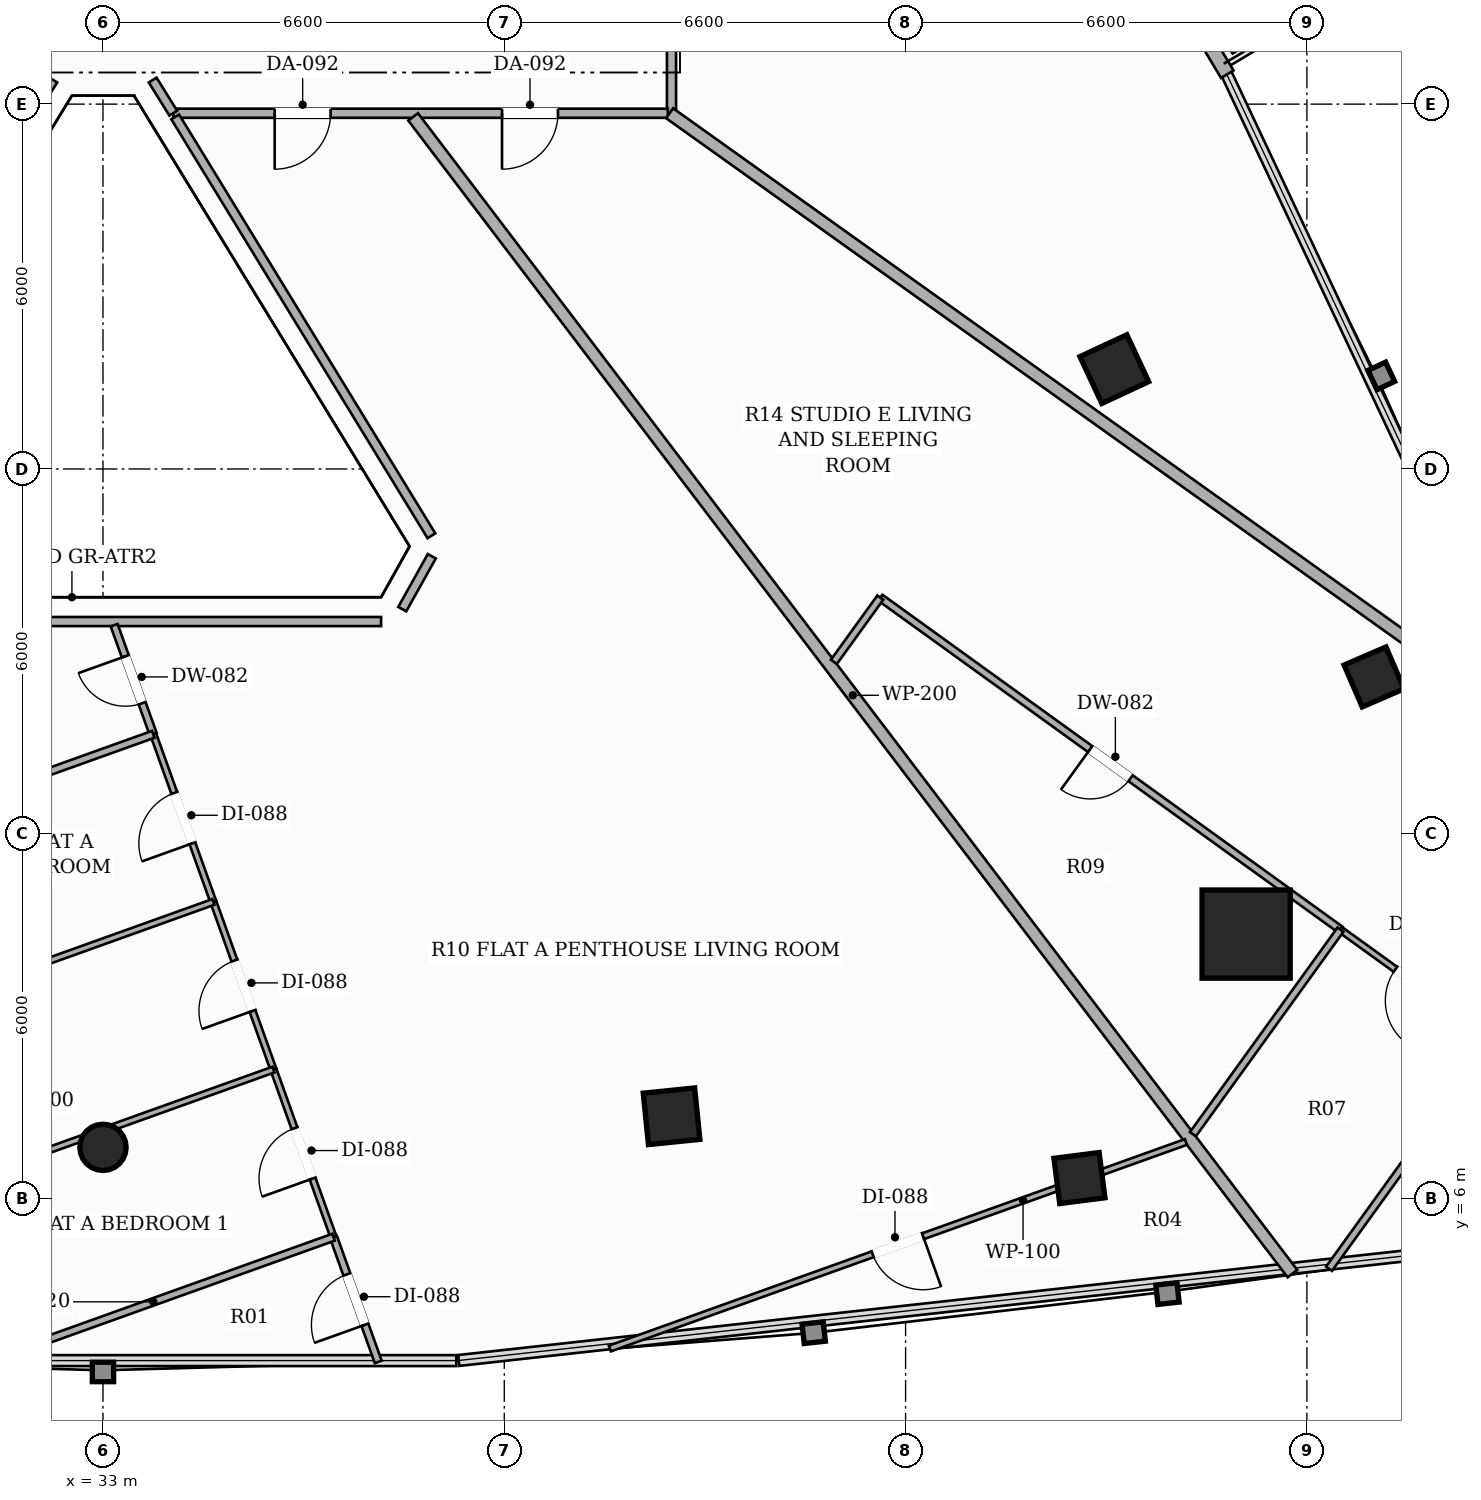
"""IFC4 building model, lengths in metres.
Left out: names, types, materials, properties, quantities, classifications, styles, units other than length and angle.
Written with IfcOpenShell. Run it as: python <this file> out.ifc"""

import sys

from ifc_helpers import new_model, si_unit, direction, frame, frame_2d, origin, origin_2d, place, context, subcontext, project, spatial, rectangle, hollow_rectangle, hollow_circle, extrude, element, fill, save


model = new_model("IFC4")
c1 = context("Model", 3, precision=1e-05, world=origin(), true_north=direction((0.0, 1.0)))
c2 = subcontext(c1, "Body", "Model", "MODEL_VIEW")
j1 = project(units=[si_unit("LENGTHUNIT", "METRE"), si_unit("PLANEANGLEUNIT", "RADIAN")], contexts=[c1])
p1 = place(None, origin())
s1 = spatial("IfcSite", under=j1, at=p1, CompositionType="ELEMENT")
p2 = place(p1, origin())
s2 = spatial("IfcBuilding", under=s1, at=p2, CompositionType="ELEMENT")
p3 = place(p2, frame((0.0, 0.0, 136.4)))
s3 = spatial("IfcBuildingStorey", under=s2, at=p3, CompositionType="ELEMENT", Elevation=136.4)
p4 = place(p3, frame((51.801, 10.351, 0.0), z_axis=(0.0, 0.0, 1.0), x_axis=(1.0, 0.0, 0.0)))
e1 = element("IfcColumn", 1, at=p4, inside=s3, PredefinedType="COLUMN", context=c2, shape_type="SweptSolid", body=[
    extrude(hollow_rectangle(XDim=1.45, YDim=1.45, WallThickness=0.045, at=origin_2d()), origin(), (0.0, 0.0, 1.0), 3.3),
])
p5 = place(p3, frame((33.0, 6.844, 0.0), z_axis=(0.0, 0.0, 1.0), x_axis=(1.0, 0.0, 0.0)))
e2 = element("IfcColumn", 2, at=p5, inside=s3, PredefinedType="COLUMN", context=c2, shape_type="SweptSolid", body=[
    extrude(hollow_circle(Radius=0.381, WallThickness=0.022, at=origin_2d()), origin(), (0.0, 0.0, 1.0), 3.3),
])
for number, where, z_axis, x_axis in (
    (3, (42.351, 7.355, 0.0), (0.0, 0.0, 1.0), (0.995, 0.101, 0.0)),
    (4, (49.633, 19.642, 0.0), (0.0, 0.0, 1.0), (-0.423, 0.906, 0.0)),
):
    element("IfcColumn", number, at=place(p3, frame(where, z_axis=z_axis, x_axis=x_axis)), inside=s3, PredefinedType="COLUMN", context=c2, shape_type="SweptSolid", body=[
        extrude(hollow_rectangle(XDim=0.85, YDim=0.85, WallThickness=0.028, at=origin_2d()), origin(), (0.0, 0.0, 1.0), 3.3),
    ])
for number, where, z_axis, x_axis in (
    (5, (49.059, 6.339, 0.0), (0.0, 0.0, 1.0), (0.992, 0.127, 0.0)),
    (6, (53.905, 14.58, 0.0), (0.0, 0.0, 1.0), (-0.397, 0.918, 0.0)),
):
    element("IfcColumn", number, at=place(p3, frame(where, z_axis=z_axis, x_axis=x_axis)), inside=s3, PredefinedType="COLUMN", context=c2, shape_type="SweptSolid", body=[
        extrude(hollow_rectangle(XDim=0.75, YDim=0.75, WallThickness=0.025, at=origin_2d()), origin(), (0.0, 0.0, 1.0), 3.3),
    ])
p6 = place(p3, frame((51.491, 24.492, 0.0), z_axis=(0.0, 0.0, 1.0), x_axis=(-0.514364263751, 0.857571807009, 0.0)))
e7 = element("IfcWall", 7, at=p6, inside=s3, PredefinedType="SOLIDWALL", context=c2, shape_type="SweptSolid", body=[
    extrude(rectangle(XDim=11.468, YDim=0.24, at=frame_2d((5.734, 0.0))), origin(), (0.0, 0.0, 1.0), 2.624),
])
p7 = place(p6, frame((8.972, 0.0, 0.0)))
e8 = element("IfcOpeningElement", 8, at=p7, cuts=e7, PredefinedType="OPENING", context=c2, shape_type="SweptSolid", body=[
    extrude(rectangle(XDim=1.8, YDim=2.2, at=frame_2d((0.9, 1.1))), frame((0.0, 0.13, 0.0), z_axis=(0.0, -1.0, 0.0), x_axis=(1.0, 0.0, 0.0)), (0.0, 0.0, 1.0), 0.26),
])
p8 = place(p3, frame((32.183, 24.396, 0.0), z_axis=(0.0, 0.0, 1.0), x_axis=(-0.527674894897, -0.849446411079, 0.0)))
e9 = element("IfcWall", 9, at=p8, inside=s3, PredefinedType="PARTITIONING", context=c2, shape_type="SweptSolid", body=[
    extrude(rectangle(XDim=0.643, YDim=0.15, at=frame_2d((0.321, 0.0))), origin(), (0.0, 0.0, 1.0), 3.06),
])
p9 = place(p3, frame((42.35, 28.34, 0.0), z_axis=(0.0, 0.0, 1.0), x_axis=(0.0, -1.0, 0.0)))
e10 = element("IfcWall", 10, at=p9, inside=s3, PredefinedType="PARTITIONING", context=c2, shape_type="SweptSolid", body=[
    extrude(rectangle(XDim=4.49, YDim=0.15, at=frame_2d((2.245, 0.0))), origin(), (0.0, 0.0, 1.0), 2.721),
])
p10 = place(p9, frame((1.805, 0.0, 0.0)))
e11 = element("IfcOpeningElement", 11, at=p10, cuts=e10, PredefinedType="OPENING", context=c2, shape_type="SweptSolid", body=[
    extrude(rectangle(XDim=0.88, YDim=2.1, at=frame_2d((0.44, 1.05))), frame((0.0, 0.085, 0.0), z_axis=(0.0, -1.0, 0.0), x_axis=(1.0, 0.0, 0.0)), (0.0, 0.0, 1.0), 0.17),
])
p11 = place(p3, frame((42.29, 23.85, 0.0), z_axis=(0.0, 0.0, 1.0), x_axis=(-1.0, 0.0, 0.0)))
e12 = element("IfcWall", 12, at=p11, inside=s3, PredefinedType="PARTITIONING", context=c2, shape_type="SweptSolid", body=[
    extrude(rectangle(XDim=8.134, YDim=0.15, at=frame_2d((4.067, 0.0))), origin(), (0.0, 0.0, 1.0), 2.492),
])
p12 = place(p11, frame((5.546, 0.0, 0.0)))
e13 = element("IfcOpeningElement", 13, at=p12, cuts=e12, PredefinedType="OPENING", context=c2, shape_type="SweptSolid", body=[
    extrude(rectangle(XDim=0.92, YDim=2.15, at=frame_2d((0.46, 1.075))), frame((0.0, 0.085, 0.0), z_axis=(0.0, -1.0, 0.0), x_axis=(1.0, 0.0, 0.0)), (0.0, 0.0, 1.0), 0.17),
])
p13 = place(p11, frame((1.807, 0.0, 0.0)))
e14 = element("IfcOpeningElement", 14, at=p13, cuts=e12, PredefinedType="OPENING", context=c2, shape_type="SweptSolid", body=[
    extrude(rectangle(XDim=0.92, YDim=2.15, at=frame_2d((0.46, 1.075))), frame((0.0, 0.085, 0.0), z_axis=(0.0, -1.0, 0.0), x_axis=(1.0, 0.0, 0.0)), (0.0, 0.0, 1.0), 0.17),
])
p14 = place(p3, frame((34.156, 23.851, 0.0), z_axis=(0.0, 0.0, 1.0), x_axis=(-0.528356729584, 0.849022476913, 0.0)))
e15 = element("IfcWall", 15, at=p14, inside=s3, PredefinedType="PARTITIONING", context=c2, shape_type="SweptSolid", body=[
    extrude(rectangle(XDim=0.642, YDim=0.15, at=frame_2d((0.321, 0.0))), origin(), (0.0, 0.0, 1.0), 3.06),
])
p15 = place(p3, frame((34.188, 23.79, 0.0), z_axis=(0.0, 0.0, 1.0), x_axis=(0.521816809014, -0.853057570057, 0.0)))
e16 = element("IfcWall", 16, at=p15, inside=s3, PredefinedType="PARTITIONING", context=c2, shape_type="SweptSolid", body=[
    extrude(rectangle(XDim=8.076, YDim=0.15, at=frame_2d((4.038, 0.0))), origin(), (0.0, 0.0, 1.0), 2.721),
])
p16 = place(p3, frame((38.408, 16.565, 0.0), z_axis=(0.0, 0.0, 1.0), x_axis=(-0.48761814532, -0.873057010942, 0.0)))
e17 = element("IfcWall", 17, at=p16, inside=s3, PredefinedType="PARTITIONING", context=c2, shape_type="SweptSolid", body=[
    extrude(rectangle(XDim=0.996, YDim=0.15, at=frame_2d((0.498, 0.0))), origin(), (0.0, 0.0, 1.0), 3.06),
])
p17 = place(p3, frame((37.574, 15.491, 0.0), z_axis=(0.0, 0.0, 1.0), x_axis=(-1.0, 0.0, 0.0)))
e18 = element("IfcWall", 18, at=p17, inside=s3, PredefinedType="PARTITIONING", context=c2, shape_type="SweptSolid", body=[
    extrude(rectangle(XDim=9.148, YDim=0.15, at=frame_2d((4.574, 0.0))), origin(), (0.0, 0.0, 1.0), 2.721),
])
p18 = place(p3, frame((38.101, 23.79, 0.0), z_axis=(0.0, 0.0, 1.0), x_axis=(0.605201904092, -0.796072016393, 0.0)))
e19 = element("IfcWall", 19, at=p18, inside=s3, PredefinedType="PARTITIONING", context=c2, shape_type="SweptSolid", body=[
    extrude(rectangle(XDim=23.896, YDim=0.2, at=frame_2d((11.948, 0.0))), origin(), (0.0, 0.0, 1.0), 2.413),
])
p19 = place(p3, frame((56.515, 13.72, 0.0), z_axis=(0.0, 0.0, 1.0), x_axis=(-0.813997291107, 0.580868668522, 0.0)))
e20 = element("IfcWall", 20, at=p19, inside=s3, PredefinedType="PARTITIONING", context=c2, shape_type="SweptSolid", body=[
    extrude(rectangle(XDim=17.44, YDim=0.2, at=frame_2d((8.72, 0.0))), origin(), (0.0, 0.0, 1.0), 2.413),
])
p20 = place(p3, frame((33.827, 13.636, 0.0), z_axis=(0.0, 0.0, 1.0), x_axis=(-0.337163686904, 0.941446041063, 0.0)))
e21 = element("IfcWall", 21, at=p20, inside=s3, PredefinedType="PARTITIONING", context=c2, shape_type="SweptSolid", body=[
    extrude(rectangle(XDim=1.906, YDim=0.12, at=frame_2d((0.953, 0.0))), origin(), (0.0, 0.0, 1.0), 2.721),
])
p21 = place(p20, frame((0.543, 0.0, 0.0)))
e22 = element("IfcOpeningElement", 22, at=p21, cuts=e21, PredefinedType="OPENING", context=c2, shape_type="SweptSolid", body=[
    extrude(rectangle(XDim=0.82, YDim=2.1, at=frame_2d((0.41, 1.05))), frame((0.0, 0.07, 0.0), z_axis=(0.0, -1.0, 0.0), x_axis=(1.0, 0.0, 0.0)), (0.0, 0.0, 1.0), 0.14),
])
p22 = place(p3, frame((37.527, 3.315, 0.0), z_axis=(0.0, 0.0, 1.0), x_axis=(-0.337393850622, 0.9413635799, 0.0)))
e23 = element("IfcWall", 23, at=p22, inside=s3, PredefinedType="PARTITIONING", context=c2, shape_type="SweptSolid", body=[
    extrude(rectangle(XDim=2.179, YDim=0.12, at=frame_2d((1.089, 0.0))), origin(), (0.0, 0.0, 1.0), 3.06),
])
p23 = place(p22, frame((0.649, 0.0, 0.0)))
e24 = element("IfcOpeningElement", 24, at=p23, cuts=e23, PredefinedType="OPENING", context=c2, shape_type="SweptSolid", body=[
    extrude(rectangle(XDim=0.88, YDim=2.1, at=frame_2d((0.44, 1.05))), frame((0.0, 0.07, 0.0), z_axis=(0.0, -1.0, 0.0), x_axis=(1.0, 0.0, 0.0)), (0.0, 0.0, 1.0), 0.14),
])
p24 = place(p3, frame((36.792, 5.366, 0.0), z_axis=(0.0, 0.0, 1.0), x_axis=(-0.33735537207, 0.941377370099, 0.0)))
e25 = element("IfcWall", 25, at=p24, inside=s3, PredefinedType="PARTITIONING", context=c2, shape_type="SweptSolid", body=[
    extrude(rectangle(XDim=2.929, YDim=0.1, at=frame_2d((1.464, 0.0))), origin(), (0.0, 0.0, 1.0), 2.413),
])
p25 = place(p24, frame((1.024, 0.0, 0.0)))
e26 = element("IfcOpeningElement", 26, at=p25, cuts=e25, PredefinedType="OPENING", context=c2, shape_type="SweptSolid", body=[
    extrude(rectangle(XDim=0.88, YDim=2.1, at=frame_2d((0.44, 1.05))), frame((0.0, 0.06, 0.0), z_axis=(0.0, -1.0, 0.0), x_axis=(1.0, 0.0, 0.0)), (0.0, 0.0, 1.0), 0.12),
])
p26 = place(p3, frame((50.81, 6.932, 0.0), z_axis=(0.0, 0.0, 1.0), x_axis=(-0.941340567411, -0.337458050943, 0.0)))
e27 = element("IfcWall", 27, at=p26, inside=s3, PredefinedType="PARTITIONING", context=c2, shape_type="SweptSolid", body=[
    extrude(rectangle(XDim=10.063, YDim=0.1, at=frame_2d((5.032, 0.0))), origin(), (0.0, 0.0, 1.0), 2.413),
])
p27 = place(p26, frame((4.592, 0.0, 0.0)))
e28 = element("IfcOpeningElement", 28, at=p27, cuts=e27, PredefinedType="OPENING", context=c2, shape_type="SweptSolid", body=[
    extrude(rectangle(XDim=0.88, YDim=2.1, at=frame_2d((0.44, 1.05))), frame((0.0, 0.06, 0.0), z_axis=(0.0, -1.0, 0.0), x_axis=(1.0, 0.0, 0.0)), (0.0, 0.0, 1.0), 0.12),
])
p28 = place(p3, frame((35.804, 8.123, 0.0), z_axis=(0.0, 0.0, 1.0), x_axis=(-0.337381847176, 0.941367881965, 0.0)))
e29 = element("IfcWall", 29, at=p28, inside=s3, PredefinedType="PARTITIONING", context=c2, shape_type="SweptSolid", body=[
    extrude(rectangle(XDim=2.928, YDim=0.1, at=frame_2d((1.464, 0.0))), origin(), (0.0, 0.0, 1.0), 3.06),
])
p29 = place(p28, frame((1.024, 0.0, 0.0)))
e30 = element("IfcOpeningElement", 30, at=p29, cuts=e29, PredefinedType="OPENING", context=c2, shape_type="SweptSolid", body=[
    extrude(rectangle(XDim=0.88, YDim=2.1, at=frame_2d((0.44, 1.05))), frame((0.0, 0.06, 0.0), z_axis=(0.0, -1.0, 0.0), x_axis=(1.0, 0.0, 0.0)), (0.0, 0.0, 1.0), 0.12),
])
p30 = place(p3, frame((34.816, 10.88, 0.0), z_axis=(0.0, 0.0, 1.0), x_axis=(-0.337756804272, 0.941233414817, 0.0)))
e31 = element("IfcWall", 31, at=p30, inside=s3, PredefinedType="PARTITIONING", context=c2, shape_type="SweptSolid", body=[
    extrude(rectangle(XDim=2.928, YDim=0.1, at=frame_2d((1.464, 0.0))), origin(), (0.0, 0.0, 1.0), 3.06),
])
p31 = place(p30, frame((1.024, 0.0, 0.0)))
e32 = element("IfcOpeningElement", 32, at=p31, cuts=e31, PredefinedType="OPENING", context=c2, shape_type="SweptSolid", body=[
    extrude(rectangle(XDim=0.88, YDim=2.1, at=frame_2d((0.44, 1.05))), frame((0.0, 0.06, 0.0), z_axis=(0.0, -1.0, 0.0), x_axis=(1.0, 0.0, 0.0)), (0.0, 0.0, 1.0), 0.12),
])
p32 = place(p3, frame((33.827, 13.636, 0.0), z_axis=(0.0, 0.0, 1.0), x_axis=(-0.941307932725, -0.337549071676, 0.0)))
e33 = element("IfcWall", 33, at=p32, inside=s3, PredefinedType="PARTITIONING", context=c2, shape_type="SweptSolid", body=[
    extrude(rectangle(XDim=4.743, YDim=0.12, at=frame_2d((2.372, 0.0))), origin(), (0.0, 0.0, 1.0), 2.721),
])
p33 = place(p3, frame((30.865, 3.241, 0.0), z_axis=(0.0, 0.0, 1.0), x_axis=(0.941328015911, 0.337493061354, 0.0)))
e34 = element("IfcWall", 34, at=p33, inside=s3, PredefinedType="PARTITIONING", context=c2, shape_type="SweptSolid", body=[
    extrude(rectangle(XDim=6.296, YDim=0.12, at=frame_2d((3.148, 0.0))), origin(), (0.0, 0.0, 1.0), 2.619),
])
p34 = place(p3, frame((28.008, 5.328, 0.0), z_axis=(0.0, 0.0, 1.0), x_axis=(0.941323677897, 0.337505160599, 0.0)))
e35 = element("IfcWall", 35, at=p34, inside=s3, PredefinedType="PARTITIONING", context=c2, shape_type="SweptSolid", body=[
    extrude(rectangle(XDim=8.282, YDim=0.1, at=frame_2d((4.141, 0.0))), origin(), (0.0, 0.0, 1.0), 2.413),
])
p35 = place(p3, frame((28.685, 8.682, 0.0), z_axis=(0.0, 0.0, 1.0), x_axis=(0.94133243901, 0.337480724291, 0.0)))
e36 = element("IfcWall", 36, at=p35, inside=s3, PredefinedType="PARTITIONING", context=c2, shape_type="SweptSolid", body=[
    extrude(rectangle(XDim=6.513, YDim=0.1, at=frame_2d((3.256, 0.0))), origin(), (0.0, 0.0, 1.0), 2.721),
])
p36 = place(p3, frame((53.352, 10.424, 0.0), z_axis=(0.0, 0.0, 1.0), x_axis=(-0.810979209295, 0.585074971343, 0.0)))
e37 = element("IfcWall", 37, at=p36, inside=s3, PredefinedType="PARTITIONING", context=c2, shape_type="SweptSolid", body=[
    extrude(rectangle(XDim=9.332, YDim=0.12, at=frame_2d((4.666, 0.0))), origin(), (0.0, 0.0, 1.0), 2.413),
])
p37 = place(p36, frame((4.256, 0.0, 0.0)))
e38 = element("IfcOpeningElement", 38, at=p37, cuts=e37, PredefinedType="OPENING", context=c2, shape_type="SweptSolid", body=[
    extrude(rectangle(XDim=0.82, YDim=2.1, at=frame_2d((0.41, 1.05))), frame((0.0, 0.07, 0.0), z_axis=(0.0, -1.0, 0.0), x_axis=(1.0, 0.0, 0.0)), (0.0, 0.0, 1.0), 0.14),
])
p38 = place(p3, frame((45.784, 15.884, 0.0), z_axis=(0.0, 0.0, 1.0), x_axis=(-0.58557264979, -0.810619930558, 0.0)))
e39 = element("IfcWall", 39, at=p38, inside=s3, PredefinedType="PARTITIONING", context=c2, shape_type="SweptSolid", body=[
    extrude(rectangle(XDim=1.303, YDim=0.12, at=frame_2d((0.651, 0.0))), origin(), (0.0, 0.0, 1.0), 2.721),
])
p39 = place(p3, frame((55.874, 8.604, 0.0), z_axis=(0.0, 0.0, 1.0), x_axis=(-0.810886170902, 0.585203911333, 0.0)))
e40 = element("IfcWall", 40, at=p39, inside=s3, PredefinedType="PARTITIONING", context=c2, shape_type="SweptSolid", body=[
    extrude(rectangle(XDim=3.11, YDim=0.1, at=frame_2d((1.555, 0.0))), origin(), (0.0, 0.0, 1.0), 2.619),
])
p40 = place(p39, frame((1.115, 0.0, 0.0)))
e41 = element("IfcOpeningElement", 41, at=p40, cuts=e40, PredefinedType="OPENING", context=c2, shape_type="SweptSolid", body=[
    extrude(rectangle(XDim=0.88, YDim=2.1, at=frame_2d((0.44, 1.05))), frame((0.0, 0.06, 0.0), z_axis=(0.0, -1.0, 0.0), x_axis=(1.0, 0.0, 0.0)), (0.0, 0.0, 1.0), 0.12),
])
p41 = place(p3, frame((53.352, 10.424, 0.0), z_axis=(0.0, 0.0, 1.0), x_axis=(-0.585041198475, -0.811003573412, 0.0)))
e42 = element("IfcWall", 42, at=p41, inside=s3, PredefinedType="PARTITIONING", context=c2, shape_type="SweptSolid", body=[
    extrude(rectangle(XDim=4.147, YDim=0.12, at=frame_2d((2.073, 0.0))), origin(), (0.0, 0.0, 1.0), 2.619),
])
p42 = place(p3, frame((53.164, 4.847, 0.0), z_axis=(0.0, 0.0, 1.0), x_axis=(0.58499591955, 0.81103623477, 0.0)))
e43 = element("IfcWall", 43, at=p42, inside=s3, PredefinedType="PARTITIONING", context=c2, shape_type="SweptSolid", body=[
    extrude(rectangle(XDim=4.632, YDim=0.12, at=frame_2d((2.316, 0.0))), origin(), (0.0, 0.0, 1.0), 3.06),
])
p43 = place(p12, origin())
e44 = element("IfcDoor", 44, at=p43, inside=s3, OperationType="SINGLE_SWING_RIGHT", PredefinedType="DOOR", context=c2, shape_type="SweptSolid", body=[
    extrude(rectangle(XDim=0.92, YDim=2.15, at=frame_2d((0.46, 1.075))), frame((0.0, 0.025, 0.0), z_axis=(0.0, -1.0, 0.0), x_axis=(1.0, 0.0, 0.0)), (0.0, 0.0, 1.0), 0.05),
])
fill(e13, e44)
p44 = place(p21, origin())
e45 = element("IfcDoor", 45, at=p44, inside=s3, OperationType="SINGLE_SWING_RIGHT", PredefinedType="DOOR", context=c2, shape_type="SweptSolid", body=[
    extrude(rectangle(XDim=0.82, YDim=2.1, at=frame_2d((0.41, 1.05))), frame((0.0, 0.025, 0.0), z_axis=(0.0, -1.0, 0.0), x_axis=(1.0, 0.0, 0.0)), (0.0, 0.0, 1.0), 0.05),
])
fill(e22, e45)
p45 = place(p23, origin())
e46 = element("IfcDoor", 46, at=p45, inside=s3, OperationType="SINGLE_SWING_LEFT", PredefinedType="DOOR", context=c2, shape_type="SweptSolid", body=[
    extrude(rectangle(XDim=0.88, YDim=2.1, at=frame_2d((0.44, 1.05))), frame((0.0, 0.025, 0.0), z_axis=(0.0, -1.0, 0.0), x_axis=(1.0, 0.0, 0.0)), (0.0, 0.0, 1.0), 0.05),
])
fill(e24, e46)
p46 = place(p25, origin())
e47 = element("IfcDoor", 47, at=p46, inside=s3, OperationType="SINGLE_SWING_LEFT", PredefinedType="DOOR", context=c2, shape_type="SweptSolid", body=[
    extrude(rectangle(XDim=0.88, YDim=2.1, at=frame_2d((0.44, 1.05))), frame((0.0, 0.025, 0.0), z_axis=(0.0, -1.0, 0.0), x_axis=(1.0, 0.0, 0.0)), (0.0, 0.0, 1.0), 0.05),
])
fill(e26, e47)
p47 = place(p27, origin())
e48 = element("IfcDoor", 48, at=p47, inside=s3, OperationType="SINGLE_SWING_LEFT", PredefinedType="DOOR", context=c2, shape_type="SweptSolid", body=[
    extrude(rectangle(XDim=0.88, YDim=2.1, at=frame_2d((0.44, 1.05))), frame((0.0, 0.025, 0.0), z_axis=(0.0, -1.0, 0.0), x_axis=(1.0, 0.0, 0.0)), (0.0, 0.0, 1.0), 0.05),
])
fill(e28, e48)
p48 = place(p29, origin())
e49 = element("IfcDoor", 49, at=p48, inside=s3, OperationType="SINGLE_SWING_LEFT", PredefinedType="DOOR", context=c2, shape_type="SweptSolid", body=[
    extrude(rectangle(XDim=0.88, YDim=2.1, at=frame_2d((0.44, 1.05))), frame((0.0, 0.025, 0.0), z_axis=(0.0, -1.0, 0.0), x_axis=(1.0, 0.0, 0.0)), (0.0, 0.0, 1.0), 0.05),
])
fill(e30, e49)
p49 = place(p31, origin())
e50 = element("IfcDoor", 50, at=p49, inside=s3, OperationType="SINGLE_SWING_LEFT", PredefinedType="DOOR", context=c2, shape_type="SweptSolid", body=[
    extrude(rectangle(XDim=0.88, YDim=2.1, at=frame_2d((0.44, 1.05))), frame((0.0, 0.025, 0.0), z_axis=(0.0, -1.0, 0.0), x_axis=(1.0, 0.0, 0.0)), (0.0, 0.0, 1.0), 0.05),
])
fill(e32, e50)
p50 = place(p13, origin())
e51 = element("IfcDoor", 51, at=p50, inside=s3, OperationType="SINGLE_SWING_RIGHT", PredefinedType="DOOR", context=c2, shape_type="SweptSolid", body=[
    extrude(rectangle(XDim=0.92, YDim=2.15, at=frame_2d((0.46, 1.075))), frame((0.0, 0.025, 0.0), z_axis=(0.0, -1.0, 0.0), x_axis=(1.0, 0.0, 0.0)), (0.0, 0.0, 1.0), 0.05),
])
fill(e14, e51)
p51 = place(p37, origin())
e52 = element("IfcDoor", 52, at=p51, inside=s3, OperationType="SINGLE_SWING_RIGHT", PredefinedType="DOOR", context=c2, shape_type="SweptSolid", body=[
    extrude(rectangle(XDim=0.82, YDim=2.1, at=frame_2d((0.41, 1.05))), frame((0.0, 0.025, 0.0), z_axis=(0.0, -1.0, 0.0), x_axis=(1.0, 0.0, 0.0)), (0.0, 0.0, 1.0), 0.05),
])
fill(e38, e52)
p52 = place(p40, origin())
e53 = element("IfcDoor", 53, at=p52, inside=s3, OperationType="SINGLE_SWING_LEFT", PredefinedType="DOOR", context=c2, shape_type="SweptSolid", body=[
    extrude(rectangle(XDim=0.88, YDim=2.1, at=frame_2d((0.44, 1.05))), frame((0.0, 0.025, 0.0), z_axis=(0.0, -1.0, 0.0), x_axis=(1.0, 0.0, 0.0)), (0.0, 0.0, 1.0), 0.05),
])
fill(e41, e53)
save(model, sys.argv[1])
